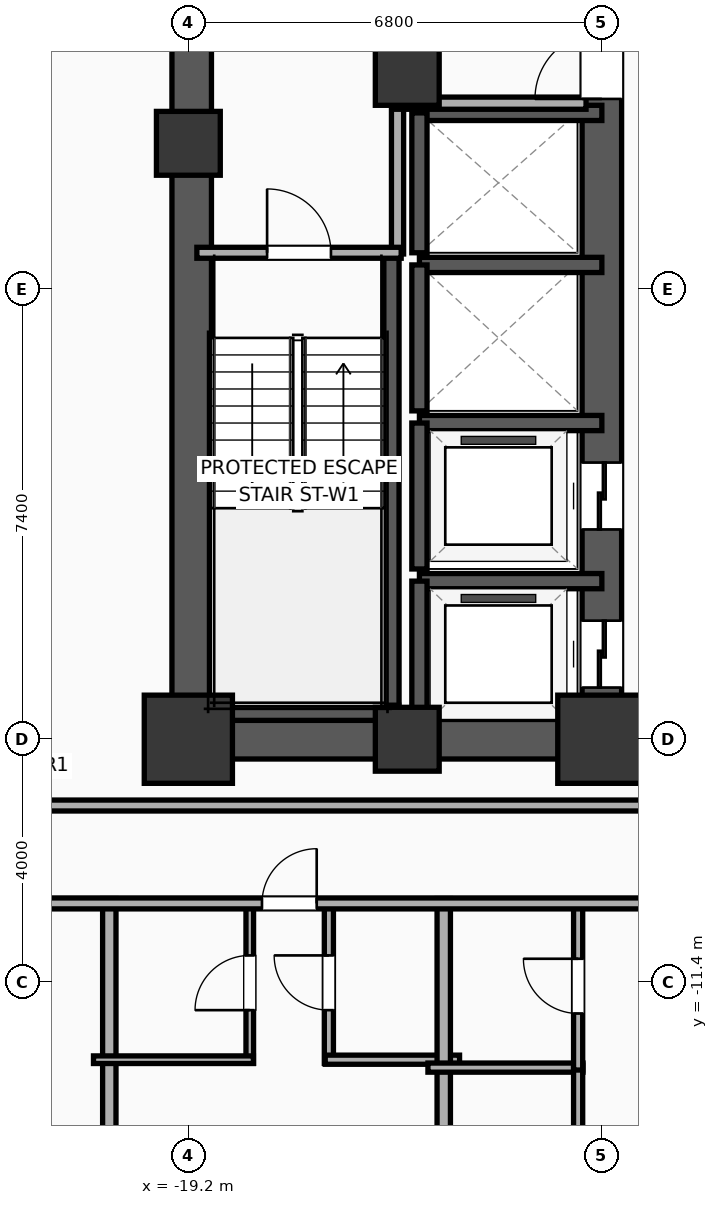
"""IFC4 building model, lengths in metres.
Left out: names, types, materials, properties, quantities, classifications, styles, units other than length and angle.
Written with IfcOpenShell. Run it as: python <this file> out.ifc"""

import sys

from ifc_helpers import new_model, si_unit, direction, frame, frame_2d, origin, origin_2d, place, context, subcontext, project, spatial, rectangle, extrude, element, fill, save


model = new_model("IFC4")
c1 = context("Model", 3, precision=1e-05, world=origin(), true_north=direction((0.0, 1.0)))
c2 = subcontext(c1, "Body", "Model", "MODEL_VIEW")
j1 = project(units=[si_unit("LENGTHUNIT", "METRE"), si_unit("PLANEANGLEUNIT", "RADIAN")], contexts=[c1])
p1 = place(None, origin())
s1 = spatial("IfcSite", under=j1, at=p1, CompositionType="ELEMENT")
p2 = place(p1, origin())
s2 = spatial("IfcBuilding", under=s1, at=p2, CompositionType="ELEMENT")
p3 = place(p2, frame((0.0, 0.0, 33.8)))
s3 = spatial("IfcBuildingStorey", under=s2, at=p3, CompositionType="ELEMENT", Elevation=33.8)
p4 = place(p3, frame((-19.2, -7.4, 0.0), z_axis=(0.0, 0.0, 1.0), x_axis=(1.0, 0.0, 0.0)))
e1 = element("IfcColumn", 1, at=p4, inside=s3, PredefinedType="COLUMN", context=c2, shape_type="SweptSolid", body=[
    extrude(rectangle(XDim=1.45, YDim=1.45, at=origin_2d()), origin(), (0.0, 0.0, 1.0), 3.9),
])
for number, where, z_axis, x_axis in (
    (2, (-19.2, 2.4, 0.0), (0.0, 0.0, 1.0), (1.0, 0.0, 0.0)),
    (3, (-15.6, -7.4, 0.0), (0.0, 0.0, 1.0), (1.0, 0.0, 0.0)),
):
    element("IfcColumn", number, at=place(p3, frame(where, z_axis=z_axis, x_axis=x_axis)), inside=s3, PredefinedType="COLUMN", context=c2, shape_type="SweptSolid", body=[
        extrude(rectangle(XDim=1.05, YDim=1.05, at=origin_2d()), origin(), (0.0, 0.0, 1.0), 3.9),
    ])
p5 = place(p3, frame((-12.4, -7.4, 0.0), z_axis=(0.0, 0.0, 1.0), x_axis=(1.0, 0.0, 0.0)))
e4 = element("IfcColumn", 4, at=p5, inside=s3, PredefinedType="COLUMN", context=c2, shape_type="SweptSolid", body=[
    extrude(rectangle(XDim=1.45, YDim=1.45, at=origin_2d()), origin(), (0.0, 0.0, 1.0), 3.9),
])
p6 = place(p3, frame((-15.6, 3.55, 0.0), z_axis=(0.0, 0.0, 1.0), x_axis=(1.0, 0.0, 0.0)))
e5 = element("IfcColumn", 5, at=p6, inside=s3, PredefinedType="COLUMN", context=c2, shape_type="SweptSolid", body=[
    extrude(rectangle(XDim=1.05, YDim=1.05, at=origin_2d()), origin(), (0.0, 0.0, 1.0), 3.9),
])
p7 = place(p3, frame((-19.525, -7.4, 0.0), z_axis=(0.0, 0.0, 1.0), x_axis=(1.0, 0.0, 0.0)))
e6 = element("IfcWall", 6, at=p7, inside=s3, PredefinedType="SHEAR", context=c2, shape_type="SweptSolid", body=[
    extrude(rectangle(XDim=7.45, YDim=0.65, at=frame_2d((3.725, 0.0))), origin(), (0.0, 0.0, 1.0), 3.65),
])
p8 = place(p3, frame((-19.145, -7.4, 0.0), z_axis=(0.0, 0.0, 1.0), x_axis=(0.0, 1.0, 0.0)))
e7 = element("IfcWall", 7, at=p8, inside=s3, PredefinedType="SHEAR", context=c2, shape_type="SweptSolid", body=[
    extrude(rectangle(XDim=14.8, YDim=0.65, at=frame_2d((7.4, 0.0))), origin(), (0.0, 0.0, 1.0), 3.65),
])
p9 = place(p3, frame((-12.4, -7.4, 0.0), z_axis=(0.0, 0.0, 1.0), x_axis=(0.0, 1.0, 0.0)))
e8 = element("IfcWall", 8, at=p9, inside=s3, PredefinedType="SHEAR", context=c2, shape_type="SweptSolid", body=[
    extrude(rectangle(XDim=14.8, YDim=0.65, at=frame_2d((7.4, 0.0))), origin(), (0.0, 0.0, 1.0), 3.65),
])
p10 = place(p9, frame((0.85, 0.0, 0.0)))
e9 = element("IfcOpeningElement", 9, at=p10, cuts=e8, PredefinedType="OPENING", context=c2, shape_type="SweptSolid", body=[
    extrude(rectangle(XDim=1.1, YDim=2.05, at=frame_2d((0.55, 1.025))), frame((0.0, 0.335, 0.0), z_axis=(0.0, -1.0, 0.0), x_axis=(1.0, 0.0, 0.0)), (0.0, 0.0, 1.0), 0.67),
])
p11 = place(p9, frame((3.45, 0.0, 0.0)))
e10 = element("IfcOpeningElement", 10, at=p11, cuts=e8, PredefinedType="OPENING", context=c2, shape_type="SweptSolid", body=[
    extrude(rectangle(XDim=1.1, YDim=2.05, at=frame_2d((0.55, 1.025))), frame((0.0, 0.335, 0.0), z_axis=(0.0, -1.0, 0.0), x_axis=(1.0, 0.0, 0.0)), (0.0, 0.0, 1.0), 0.67),
])
p12 = place(p9, frame((10.53, 0.0, 0.0)))
e11 = element("IfcOpeningElement", 11, at=p12, cuts=e8, PredefinedType="OPENING", context=c2, shape_type="SweptSolid", body=[
    extrude(rectangle(XDim=1.1, YDim=2.05, at=frame_2d((0.55, 1.025))), frame((0.0, 0.335, 0.0), z_axis=(0.0, -1.0, 0.0), x_axis=(1.0, 0.0, 0.0)), (0.0, 0.0, 1.0), 0.67),
])
p13 = place(p3, frame((-15.86, -7.085, 0.0), z_axis=(0.0, 0.0, 1.0), x_axis=(0.0, 1.0, 0.0)))
e12 = element("IfcWall", 12, at=p13, inside=s3, PredefinedType="SOLIDWALL", context=c2, shape_type="SweptSolid", body=[
    extrude(rectangle(XDim=7.685, YDim=0.25, at=frame_2d((3.843, 0.0))), origin(), (0.0, 0.0, 1.0), 3.65),
])
p14 = place(p3, frame((-19.2, -6.965, 0.0), z_axis=(0.0, 0.0, 1.0), x_axis=(1.0, 0.0, 0.0)))
e13 = element("IfcWall", 13, at=p14, inside=s3, PredefinedType="SOLIDWALL", context=c2, shape_type="SweptSolid", body=[
    extrude(rectangle(XDim=3.46, YDim=0.25, at=frame_2d((1.73, 0.0))), origin(), (0.0, 0.0, 1.0), 3.65),
])
p15 = place(p3, frame((-12.4, -4.8, 0.0), z_axis=(0.0, 0.0, 1.0), x_axis=(-1.0, 0.0, 0.0)))
e14 = element("IfcWall", 14, at=p15, inside=s3, PredefinedType="SOLIDWALL", context=c2, shape_type="SweptSolid", body=[
    extrude(rectangle(XDim=3.0, YDim=0.25, at=frame_2d((1.5, 0.0))), origin(), (0.0, 0.0, 1.0), 3.65),
])
p16 = place(p3, frame((-15.4, -4.8, 0.0), z_axis=(0.0, 0.0, 1.0), x_axis=(0.0, -1.0, 0.0)))
e15 = element("IfcWall", 15, at=p16, inside=s3, PredefinedType="SOLIDWALL", context=c2, shape_type="SweptSolid", body=[
    extrude(rectangle(XDim=2.6, YDim=0.25, at=frame_2d((1.3, 0.0))), origin(), (0.0, 0.0, 1.0), 3.65),
])
p17 = place(p3, frame((-12.4, -2.2, 0.0), z_axis=(0.0, 0.0, 1.0), x_axis=(-1.0, 0.0, 0.0)))
e16 = element("IfcWall", 16, at=p17, inside=s3, PredefinedType="SOLIDWALL", context=c2, shape_type="SweptSolid", body=[
    extrude(rectangle(XDim=3.0, YDim=0.25, at=frame_2d((1.5, 0.0))), origin(), (0.0, 0.0, 1.0), 3.65),
])
p18 = place(p3, frame((-15.4, -2.2, 0.0), z_axis=(0.0, 0.0, 1.0), x_axis=(0.0, -1.0, 0.0)))
e17 = element("IfcWall", 17, at=p18, inside=s3, PredefinedType="SOLIDWALL", context=c2, shape_type="SweptSolid", body=[
    extrude(rectangle(XDim=2.4, YDim=0.25, at=frame_2d((1.2, 0.0))), origin(), (0.0, 0.0, 1.0), 3.65),
])
p19 = place(p3, frame((-12.4, 0.4, 0.0), z_axis=(0.0, 0.0, 1.0), x_axis=(-1.0, 0.0, 0.0)))
e18 = element("IfcWall", 18, at=p19, inside=s3, PredefinedType="SOLIDWALL", context=c2, shape_type="SweptSolid", body=[
    extrude(rectangle(XDim=3.0, YDim=0.25, at=frame_2d((1.5, 0.0))), origin(), (0.0, 0.0, 1.0), 3.65),
])
p20 = place(p3, frame((-15.4, 0.4, 0.0), z_axis=(0.0, 0.0, 1.0), x_axis=(0.0, -1.0, 0.0)))
e19 = element("IfcWall", 19, at=p20, inside=s3, PredefinedType="SOLIDWALL", context=c2, shape_type="SweptSolid", body=[
    extrude(rectangle(XDim=2.4, YDim=0.25, at=frame_2d((1.2, 0.0))), origin(), (0.0, 0.0, 1.0), 3.65),
])
p21 = place(p3, frame((-12.4, 2.9, 0.0), z_axis=(0.0, 0.0, 1.0), x_axis=(-1.0, 0.0, 0.0)))
e20 = element("IfcWall", 20, at=p21, inside=s3, PredefinedType="SOLIDWALL", context=c2, shape_type="SweptSolid", body=[
    extrude(rectangle(XDim=3.0, YDim=0.25, at=frame_2d((1.5, 0.0))), origin(), (0.0, 0.0, 1.0), 3.65),
])
p22 = place(p3, frame((-15.4, 2.9, 0.0), z_axis=(0.0, 0.0, 1.0), x_axis=(0.0, -1.0, 0.0)))
e21 = element("IfcWall", 21, at=p22, inside=s3, PredefinedType="SOLIDWALL", context=c2, shape_type="SweptSolid", body=[
    extrude(rectangle(XDim=2.3, YDim=0.25, at=frame_2d((1.15, 0.0))), origin(), (0.0, 0.0, 1.0), 3.65),
])
p23 = place(p3, frame((-15.76, 0.58, 0.0), z_axis=(0.0, 0.0, 1.0), x_axis=(0.0, 1.0, 0.0)))
e22 = element("IfcWall", 22, at=p23, inside=s3, PredefinedType="PARTITIONING", context=c2, shape_type="SweptSolid", body=[
    extrude(rectangle(XDim=2.52, YDim=0.2, at=frame_2d((1.26, 0.0))), origin(), (0.0, 0.0, 1.0), 3.65),
])
p24 = place(p3, frame((-15.82, 3.06, 0.0), z_axis=(0.0, 0.0, 1.0), x_axis=(1.0, 0.0, 0.0)))
e23 = element("IfcWall", 23, at=p24, inside=s3, PredefinedType="PARTITIONING", context=c2, shape_type="SweptSolid", body=[
    extrude(rectangle(XDim=3.16, YDim=0.2, at=frame_2d((1.58, 0.0))), origin(), (0.0, 0.0, 1.0), 3.65),
])
p25 = place(p3, frame((-19.06, 0.6, 0.0), z_axis=(0.0, 0.0, 1.0), x_axis=(1.0, 0.0, 0.0)))
e24 = element("IfcWall", 24, at=p25, inside=s3, PredefinedType="PARTITIONING", context=c2, shape_type="SweptSolid", body=[
    extrude(rectangle(XDim=3.36, YDim=0.18, at=frame_2d((1.68, 0.0))), origin(), (0.0, 0.0, 1.0), 3.65),
])
p26 = place(p25, frame((1.155, 0.0, 0.0)))
e25 = element("IfcOpeningElement", 25, at=p26, cuts=e24, PredefinedType="OPENING", context=c2, shape_type="SweptSolid", body=[
    extrude(rectangle(XDim=1.05, YDim=2.05, at=frame_2d((0.525, 1.025))), frame((0.0, 0.1, 0.0), z_axis=(0.0, -1.0, 0.0), x_axis=(1.0, 0.0, 0.0)), (0.0, 0.0, 1.0), 0.2),
])
p27 = place(p3, frame((-12.15, -7.12, 0.0), z_axis=(0.0, 0.0, 1.0), x_axis=(1.0, 0.0, 0.0)))
e26 = element("IfcWall", 26, at=p27, inside=s3, PredefinedType="PARTITIONING", context=c2, shape_type="SweptSolid", body=[
    extrude(rectangle(XDim=2.27, YDim=0.18, at=frame_2d((1.135, 0.0))), origin(), (0.0, 0.0, 1.0), 2.94),
])
p28 = place(p3, frame((-33.41, -8.49, 0.0), z_axis=(0.0, 0.0, 1.0), x_axis=(1.0, 0.0, 0.0)))
e27 = element("IfcWall", 27, at=p28, inside=s3, PredefinedType="PARTITIONING", context=c2, shape_type="SweptSolid", body=[
    extrude(rectangle(XDim=23.53, YDim=0.18, at=frame_2d((11.765, 0.0))), origin(), (0.0, 0.0, 1.0), 3.65),
])
p29 = place(p3, frame((-20.5, -22.21, 0.0), z_axis=(0.0, 0.0, 1.0), x_axis=(0.0, 1.0, 0.0)))
e28 = element("IfcWall", 28, at=p29, inside=s3, PredefinedType="PARTITIONING", context=c2, shape_type="SweptSolid", body=[
    extrude(rectangle(XDim=12.19, YDim=0.22, at=frame_2d((6.095, 0.0))), origin(), (0.0, 0.0, 1.0), 3.65),
])
p30 = place(p3, frame((-18.19, -12.73, 0.0), z_axis=(0.0, 0.0, 1.0), x_axis=(0.0, 1.0, 0.0)))
e29 = element("IfcWall", 29, at=p30, inside=s3, PredefinedType="PARTITIONING", context=c2, shape_type="SweptSolid", body=[
    extrude(rectangle(XDim=2.65, YDim=0.125, at=frame_2d((1.325, 0.0))), origin(), (0.0, 0.0, 1.0), 3.65),
])
p31 = place(p30, frame((0.875, 0.0, 0.0)))
e30 = element("IfcOpeningElement", 30, at=p31, cuts=e29, PredefinedType="OPENING", context=c2, shape_type="SweptSolid", body=[
    extrude(rectangle(XDim=0.9, YDim=2.05, at=frame_2d((0.45, 1.025))), frame((0.0, 0.073, 0.0), z_axis=(0.0, -1.0, 0.0), x_axis=(1.0, 0.0, 0.0)), (0.0, 0.0, 1.0), 0.145),
])
p32 = place(p3, frame((-16.889, -12.73, 0.0), z_axis=(0.0, 0.0, 1.0), x_axis=(0.0, 1.0, 0.0)))
e31 = element("IfcWall", 31, at=p32, inside=s3, PredefinedType="PLUMBINGWALL", context=c2, shape_type="SweptSolid", body=[
    extrude(rectangle(XDim=2.65, YDim=0.15, at=frame_2d((1.325, 0.0))), origin(), (0.0, 0.0, 1.0), 3.65),
])
p33 = place(p32, frame((0.875, 0.0, 0.0)))
e32 = element("IfcOpeningElement", 32, at=p33, cuts=e31, PredefinedType="OPENING", context=c2, shape_type="SweptSolid", body=[
    extrude(rectangle(XDim=0.9, YDim=2.05, at=frame_2d((0.45, 1.025))), frame((0.0, 0.085, 0.0), z_axis=(0.0, -1.0, 0.0), x_axis=(1.0, 0.0, 0.0)), (0.0, 0.0, 1.0), 0.17),
])
p34 = place(p3, frame((-20.76, -12.67, 0.0), z_axis=(0.0, 0.0, 1.0), x_axis=(1.0, 0.0, 0.0)))
e33 = element("IfcWall", 33, at=p34, inside=s3, PredefinedType="PARTITIONING", context=c2, shape_type="SweptSolid", body=[
    extrude(rectangle(XDim=2.63, YDim=0.125, at=frame_2d((1.315, 0.0))), origin(), (0.0, 0.0, 1.0), 3.65),
])
p35 = place(p3, frame((-16.949, -12.67, 0.0), z_axis=(0.0, 0.0, 1.0), x_axis=(1.0, 0.0, 0.0)))
e34 = element("IfcWall", 34, at=p35, inside=s3, PredefinedType="PLUMBINGWALL", context=c2, shape_type="SweptSolid", body=[
    extrude(rectangle(XDim=2.209, YDim=0.15, at=frame_2d((1.104, 0.0))), origin(), (0.0, 0.0, 1.0), 3.65),
])
p36 = place(p3, frame((-15.0, -22.21, 0.0), z_axis=(0.0, 0.0, 1.0), x_axis=(0.0, 1.0, 0.0)))
e35 = element("IfcWall", 35, at=p36, inside=s3, PredefinedType="PARTITIONING", context=c2, shape_type="SweptSolid", body=[
    extrude(rectangle(XDim=12.19, YDim=0.22, at=frame_2d((6.095, 0.0))), origin(), (0.0, 0.0, 1.0), 3.65),
])
p37 = place(p3, frame((-15.26, -12.8, 0.0), z_axis=(0.0, 0.0, 1.0), x_axis=(1.0, 0.0, 0.0)))
e36 = element("IfcWall", 36, at=p37, inside=s3, PredefinedType="PLUMBINGWALL", context=c2, shape_type="SweptSolid", body=[
    extrude(rectangle(XDim=2.55, YDim=0.15, at=frame_2d((1.275, 0.0))), origin(), (0.0, 0.0, 1.0), 3.65),
])
p38 = place(p3, frame((-12.79, -22.258, 0.0), z_axis=(0.0, 0.0, 1.0), x_axis=(0.0, 1.0, 0.0)))
e37 = element("IfcWall", 37, at=p38, inside=s3, PredefinedType="PLUMBINGWALL", context=c2, shape_type="SweptSolid", body=[
    extrude(rectangle(XDim=9.498, YDim=0.15, at=frame_2d((4.749, 0.0))), origin(), (0.0, 0.0, 1.0), 3.65),
])
p39 = place(p38, frame((7.338, 0.0, 0.0)))
e38 = element("IfcOpeningElement", 38, at=p39, cuts=e37, PredefinedType="OPENING", context=c2, shape_type="SweptSolid", body=[
    extrude(rectangle(XDim=0.9, YDim=2.05, at=frame_2d((0.45, 1.025))), frame((0.0, 0.085, 0.0), z_axis=(0.0, -1.0, 0.0), x_axis=(1.0, 0.0, 0.0)), (0.0, 0.0, 1.0), 0.17),
])
p40 = place(p3, frame((-12.79, -12.84, 0.0), z_axis=(0.0, 0.0, 1.0), x_axis=(0.0, 1.0, 0.0)))
e39 = element("IfcWall", 39, at=p40, inside=s3, PredefinedType="PLUMBINGWALL", context=c2, shape_type="SweptSolid", body=[
    extrude(rectangle(XDim=2.76, YDim=0.15, at=frame_2d((1.38, 0.0))), origin(), (0.0, 0.0, 1.0), 3.65),
])
p41 = place(p40, frame((0.93, 0.0, 0.0)))
e40 = element("IfcOpeningElement", 40, at=p41, cuts=e39, PredefinedType="OPENING", context=c2, shape_type="SweptSolid", body=[
    extrude(rectangle(XDim=0.9, YDim=2.05, at=frame_2d((0.45, 1.025))), frame((0.0, 0.085, 0.0), z_axis=(0.0, -1.0, 0.0), x_axis=(1.0, 0.0, 0.0)), (0.0, 0.0, 1.0), 0.17),
])
p42 = place(p3, frame((-33.41, -10.1, 0.0), z_axis=(0.0, 0.0, 1.0), x_axis=(1.0, 0.0, 0.0)))
e41 = element("IfcWall", 41, at=p42, inside=s3, PredefinedType="PARTITIONING", context=c2, shape_type="SweptSolid", body=[
    extrude(rectangle(XDim=59.62, YDim=0.18, at=frame_2d((29.81, 0.0))), origin(), (0.0, 0.0, 1.0), 3.65),
])
p43 = place(p42, frame((3.259, 0.0, 0.0)))
e42 = element("IfcOpeningElement", 42, at=p43, cuts=e41, PredefinedType="OPENING", context=c2, shape_type="SweptSolid", body=[
    extrude(rectangle(XDim=1.15, YDim=2.05, at=frame_2d((0.575, 1.025))), frame((0.0, 0.1, 0.0), z_axis=(0.0, -1.0, 0.0), x_axis=(1.0, 0.0, 0.0)), (0.0, 0.0, 1.0), 0.2),
])
p44 = place(p42, frame((10.657, 0.0, 0.0)))
e43 = element("IfcOpeningElement", 43, at=p44, cuts=e41, PredefinedType="OPENING", context=c2, shape_type="SweptSolid", body=[
    extrude(rectangle(XDim=1.15, YDim=2.05, at=frame_2d((0.575, 1.025))), frame((0.0, 0.1, 0.0), z_axis=(0.0, -1.0, 0.0), x_axis=(1.0, 0.0, 0.0)), (0.0, 0.0, 1.0), 0.2),
])
p45 = place(p42, frame((15.421, 0.0, 0.0)))
e44 = element("IfcOpeningElement", 44, at=p45, cuts=e41, PredefinedType="OPENING", context=c2, shape_type="SweptSolid", body=[
    extrude(rectangle(XDim=0.9, YDim=2.05, at=frame_2d((0.45, 1.025))), frame((0.0, 0.1, 0.0), z_axis=(0.0, -1.0, 0.0), x_axis=(1.0, 0.0, 0.0)), (0.0, 0.0, 1.0), 0.2),
])
p46 = place(p42, frame((21.657, 0.0, 0.0)))
e45 = element("IfcOpeningElement", 45, at=p46, cuts=e41, PredefinedType="OPENING", context=c2, shape_type="SweptSolid", body=[
    extrude(rectangle(XDim=1.15, YDim=2.05, at=frame_2d((0.575, 1.025))), frame((0.0, 0.1, 0.0), z_axis=(0.0, -1.0, 0.0), x_axis=(1.0, 0.0, 0.0)), (0.0, 0.0, 1.0), 0.2),
])
p47 = place(p42, frame((26.421, 0.0, 0.0)))
e46 = element("IfcOpeningElement", 46, at=p47, cuts=e41, PredefinedType="OPENING", context=c2, shape_type="SweptSolid", body=[
    extrude(rectangle(XDim=0.9, YDim=2.05, at=frame_2d((0.45, 1.025))), frame((0.0, 0.1, 0.0), z_axis=(0.0, -1.0, 0.0), x_axis=(1.0, 0.0, 0.0)), (0.0, 0.0, 1.0), 0.2),
])
p48 = place(p42, frame((32.657, 0.0, 0.0)))
e47 = element("IfcOpeningElement", 47, at=p48, cuts=e41, PredefinedType="OPENING", context=c2, shape_type="SweptSolid", body=[
    extrude(rectangle(XDim=1.15, YDim=2.05, at=frame_2d((0.575, 1.025))), frame((0.0, 0.1, 0.0), z_axis=(0.0, -1.0, 0.0), x_axis=(1.0, 0.0, 0.0)), (0.0, 0.0, 1.0), 0.2),
])
p49 = place(p42, frame((36.008, 0.0, 0.0)))
e48 = element("IfcOpeningElement", 48, at=p49, cuts=e41, PredefinedType="OPENING", context=c2, shape_type="SweptSolid", body=[
    extrude(rectangle(XDim=1.15, YDim=2.05, at=frame_2d((0.575, 1.025))), frame((0.0, 0.1, 0.0), z_axis=(0.0, -1.0, 0.0), x_axis=(1.0, 0.0, 0.0)), (0.0, 0.0, 1.0), 0.2),
])
p50 = place(p42, frame((42.917, 0.0, 0.0)))
e49 = element("IfcOpeningElement", 49, at=p50, cuts=e41, PredefinedType="OPENING", context=c2, shape_type="SweptSolid", body=[
    extrude(rectangle(XDim=0.9, YDim=2.05, at=frame_2d((0.45, 1.025))), frame((0.0, 0.1, 0.0), z_axis=(0.0, -1.0, 0.0), x_axis=(1.0, 0.0, 0.0)), (0.0, 0.0, 1.0), 0.2),
])
p51 = place(p42, frame((47.008, 0.0, 0.0)))
e50 = element("IfcOpeningElement", 50, at=p51, cuts=e41, PredefinedType="OPENING", context=c2, shape_type="SweptSolid", body=[
    extrude(rectangle(XDim=1.15, YDim=2.05, at=frame_2d((0.575, 1.025))), frame((0.0, 0.1, 0.0), z_axis=(0.0, -1.0, 0.0), x_axis=(1.0, 0.0, 0.0)), (0.0, 0.0, 1.0), 0.2),
])
p52 = place(p42, frame((55.14, 0.0, 0.0)))
e51 = element("IfcOpeningElement", 51, at=p52, cuts=e41, PredefinedType="OPENING", context=c2, shape_type="SweptSolid", body=[
    extrude(rectangle(XDim=1.15, YDim=2.05, at=frame_2d((0.575, 1.025))), frame((0.0, 0.1, 0.0), z_axis=(0.0, -1.0, 0.0), x_axis=(1.0, 0.0, 0.0)), (0.0, 0.0, 1.0), 0.2),
])
p53 = place(p10, origin())
e52 = element("IfcDoor", 52, at=p53, inside=s3, OperationType="SLIDING_TO_LEFT", PredefinedType="DOOR", context=c2, shape_type="SweptSolid", body=[
    extrude(rectangle(XDim=1.1, YDim=2.05, at=frame_2d((0.55, 1.025))), frame((0.0, 0.025, 0.0), z_axis=(0.0, -1.0, 0.0), x_axis=(1.0, 0.0, 0.0)), (0.0, 0.0, 1.0), 0.05),
])
fill(e9, e52)
p54 = place(p11, origin())
e53 = element("IfcDoor", 53, at=p54, inside=s3, OperationType="SLIDING_TO_LEFT", PredefinedType="DOOR", context=c2, shape_type="SweptSolid", body=[
    extrude(rectangle(XDim=1.1, YDim=2.05, at=frame_2d((0.55, 1.025))), frame((0.0, 0.025, 0.0), z_axis=(0.0, -1.0, 0.0), x_axis=(1.0, 0.0, 0.0)), (0.0, 0.0, 1.0), 0.05),
])
fill(e10, e53)
p55 = place(p26, origin())
e54 = element("IfcDoor", 54, at=p55, inside=s3, OperationType="SINGLE_SWING_LEFT", PredefinedType="DOOR", context=c2, shape_type="SweptSolid", body=[
    extrude(rectangle(XDim=1.05, YDim=2.05, at=frame_2d((0.525, 1.025))), frame((0.0, 0.025, 0.0), z_axis=(0.0, -1.0, 0.0), x_axis=(1.0, 0.0, 0.0)), (0.0, 0.0, 1.0), 0.05),
])
fill(e25, e54)
p56 = place(p31, origin())
e55 = element("IfcDoor", 55, at=p56, inside=s3, OperationType="SINGLE_SWING_LEFT", PredefinedType="DOOR", context=c2, shape_type="SweptSolid", body=[
    extrude(rectangle(XDim=0.9, YDim=2.05, at=frame_2d((0.45, 1.025))), frame((0.0, 0.025, 0.0), z_axis=(0.0, -1.0, 0.0), x_axis=(1.0, 0.0, 0.0)), (0.0, 0.0, 1.0), 0.05),
])
fill(e30, e55)
p57 = place(p33, origin())
e56 = element("IfcDoor", 56, at=p57, inside=s3, OperationType="SINGLE_SWING_RIGHT", PredefinedType="DOOR", context=c2, shape_type="SweptSolid", body=[
    extrude(rectangle(XDim=0.9, YDim=2.05, at=frame_2d((0.45, 1.025))), frame((0.0, 0.025, 0.0), z_axis=(0.0, -1.0, 0.0), x_axis=(1.0, 0.0, 0.0)), (0.0, 0.0, 1.0), 0.05),
])
fill(e32, e56)
p58 = place(p41, origin())
e57 = element("IfcDoor", 57, at=p58, inside=s3, OperationType="SINGLE_SWING_RIGHT", PredefinedType="DOOR", context=c2, shape_type="SweptSolid", body=[
    extrude(rectangle(XDim=0.9, YDim=2.05, at=frame_2d((0.45, 1.025))), frame((0.0, 0.025, 0.0), z_axis=(0.0, -1.0, 0.0), x_axis=(1.0, 0.0, 0.0)), (0.0, 0.0, 1.0), 0.05),
])
fill(e40, e57)
p59 = place(p45, origin())
e58 = element("IfcDoor", 58, at=p59, inside=s3, OperationType="SINGLE_SWING_RIGHT", PredefinedType="DOOR", context=c2, shape_type="SweptSolid", body=[
    extrude(rectangle(XDim=0.9, YDim=2.05, at=frame_2d((0.45, 1.025))), frame((0.0, 0.025, 0.0), z_axis=(0.0, -1.0, 0.0), x_axis=(1.0, 0.0, 0.0)), (0.0, 0.0, 1.0), 0.05),
])
fill(e44, e58)
p60 = place(p12, origin())
e59 = element("IfcDoor", 59, at=p60, inside=s3, OperationType="SINGLE_SWING_LEFT", PredefinedType="DOOR", context=c2, shape_type="SweptSolid", body=[
    extrude(rectangle(XDim=1.1, YDim=2.05, at=frame_2d((0.55, 1.025))), frame((0.0, 0.025, 0.0), z_axis=(0.0, -1.0, 0.0), x_axis=(1.0, 0.0, 0.0)), (0.0, 0.0, 1.0), 0.05),
])
fill(e11, e59)
save(model, sys.argv[1])
